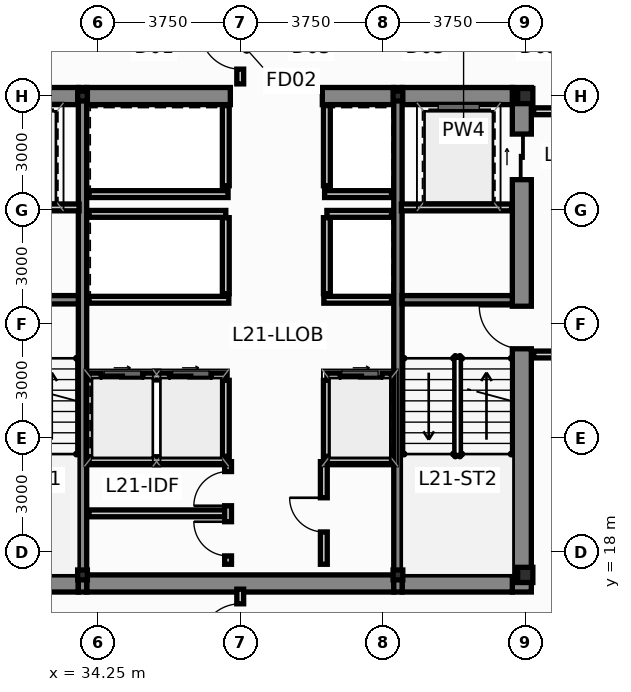
"""IFC4 building model, lengths in metres.
Left out: names, types, materials, properties, quantities, classifications, styles, units other than length and angle.
Written with IfcOpenShell. Run it as: python <this file> out.ifc"""

import sys

from ifc_helpers import new_model, si_unit, direction, frame, frame_2d, origin, origin_2d, place, context, subcontext, project, spatial, rectangle, i_section, extrude, source, transform, mapped, element, fill, save


model = new_model("IFC4")
c1 = context("Model", 3, precision=1e-05, world=origin(), true_north=direction((0.0, 1.0)))
c2 = subcontext(c1, "Body", "Model", "MODEL_VIEW")
j1 = project(units=[si_unit("LENGTHUNIT", "METRE"), si_unit("PLANEANGLEUNIT", "RADIAN")], contexts=[c1])
p1 = place(None, origin())
s1 = spatial("IfcSite", under=j1, at=p1, CompositionType="ELEMENT")
p2 = place(p1, origin())
s2 = spatial("IfcBuilding", under=s1, at=p2, CompositionType="ELEMENT")
p3 = place(p2, frame((0.0, 0.0, 83.5)))
s3 = spatial("IfcBuildingStorey", under=s2, at=p3, CompositionType="ELEMENT", Elevation=83.5)
m1 = source(origin(), c2, "Body", "SweptSolid", [
    extrude(i_section(OverallWidth=0.4, OverallDepth=0.4, WebThickness=0.02, FlangeThickness=0.032, at=origin_2d()), origin(), (0.0, 0.0, 1.0), 3.65),
])
for number, where, z_axis, x_axis in (
    (1, (45.5, 17.4, 0.0), (0.0, 0.0, 1.0), (1.0, 0.0, 0.0)),
    (2, (45.5, 30.0, 0.0), (0.0, 0.0, 1.0), (1.0, 0.0, 0.0)),
):
    element("IfcColumn", number, at=place(p3, frame(where, z_axis=z_axis, x_axis=x_axis)), inside=s3, PredefinedType="COLUMN", context=c2, shape_type="MappedRepresentation", body=[
        mapped(m1, transform((0.0, 0.0, 0.0), scale=1.0)),
    ])
m2 = source(origin(), c2, "Body", "SweptSolid", [
    extrude(i_section(OverallWidth=0.256, OverallDepth=0.26, WebThickness=0.01, FlangeThickness=0.017, at=origin_2d()), origin(), (0.0, 0.0, 1.0), 3.65),
])
for number, where, z_axis, x_axis in (
    (3, (33.85, 17.4, 0.0), (0.0, 0.0, 1.0), (1.0, 0.0, 0.0)),
    (4, (42.15, 17.4, 0.0), (0.0, 0.0, 1.0), (1.0, 0.0, 0.0)),
    (5, (33.85, 30.0, 0.0), (0.0, 0.0, 1.0), (1.0, 0.0, 0.0)),
    (6, (42.15, 30.0, 0.0), (0.0, 0.0, 1.0), (1.0, 0.0, 0.0)),
):
    element("IfcColumn", number, at=place(p3, frame(where, z_axis=z_axis, x_axis=x_axis)), inside=s3, PredefinedType="COLUMN", context=c2, shape_type="MappedRepresentation", body=[
        mapped(m2, transform((0.0, 0.0, 0.0), scale=1.0)),
    ])
p4 = place(p3, frame((45.41, 16.95, 0.0), z_axis=(0.0, 0.0, 1.0), x_axis=(0.0, 1.0, 0.0)))
e7 = element("IfcWall", 7, at=p4, inside=s3, PredefinedType="SHEAR", context=c2, shape_type="SweptSolid", body=[
    extrude(rectangle(XDim=13.275, YDim=0.5, at=frame_2d((6.638, 0.0))), origin(), (0.0, 0.0, 1.0), 3.65),
])
p5 = place(p4, frame((6.4, 0.0, 0.0)))
e8 = element("IfcOpeningElement", 8, at=p5, cuts=e7, PredefinedType="OPENING", context=c2, shape_type="SweptSolid", body=[
    extrude(rectangle(XDim=1.12, YDim=2.15, at=frame_2d((0.56, 1.075))), frame((0.0, 0.262, 0.0), z_axis=(0.0, -1.0, 0.0), x_axis=(1.0, 0.0, 0.0)), (0.0, 0.0, 1.0), 0.524),
])
p6 = place(p4, frame((10.85, 0.0, 0.0)))
e9 = element("IfcOpeningElement", 9, at=p6, cuts=e7, PredefinedType="OPENING", context=c2, shape_type="SweptSolid", body=[
    extrude(rectangle(XDim=1.2, YDim=2.2, at=frame_2d((0.6, 1.1))), frame((0.0, 0.262, 0.0), z_axis=(0.0, -1.0, 0.0), x_axis=(1.0, 0.0, 0.0)), (0.0, 0.0, 1.0), 0.524),
])
p7 = place(p3, frame((30.84, 17.175, 0.0), z_axis=(0.0, 0.0, 1.0), x_axis=(1.0, 0.0, 0.0)))
e10 = element("IfcWall", 10, at=p7, inside=s3, PredefinedType="SHEAR", context=c2, shape_type="SweptSolid", body=[
    extrude(rectangle(XDim=2.9, YDim=0.45, at=frame_2d((1.45, 0.0))), origin(), (0.0, 0.0, 1.0), 3.65),
])
p8 = place(p3, frame((33.96, 17.175, 0.0), z_axis=(0.0, 0.0, 1.0), x_axis=(1.0, 0.0, 0.0)))
e11 = element("IfcWall", 11, at=p8, inside=s3, PredefinedType="SHEAR", context=c2, shape_type="SweptSolid", body=[
    extrude(rectangle(XDim=8.08, YDim=0.45, at=frame_2d((4.04, 0.0))), origin(), (0.0, 0.0, 1.0), 3.65),
])
for number, where, z_axis, x_axis in (
    (12, (42.26, 17.175, 0.0), (0.0, 0.0, 1.0), (1.0, 0.0, 0.0)),
    (13, (30.84, 30.0, 0.0), (0.0, 0.0, 1.0), (1.0, 0.0, 0.0)),
):
    element("IfcWall", number, at=place(p3, frame(where, z_axis=z_axis, x_axis=x_axis)), inside=s3, PredefinedType="SHEAR", context=c2, shape_type="SweptSolid", body=[
        extrude(rectangle(XDim=2.9, YDim=0.45, at=frame_2d((1.45, 0.0))), origin(), (0.0, 0.0, 1.0), 3.65),
    ])
p9 = place(p3, frame((33.96, 30.0, 0.0), z_axis=(0.0, 0.0, 1.0), x_axis=(1.0, 0.0, 0.0)))
e14 = element("IfcWall", 14, at=p9, inside=s3, PredefinedType="SHEAR", context=c2, shape_type="SweptSolid", body=[
    extrude(rectangle(XDim=3.78, YDim=0.45, at=frame_2d((1.89, 0.0))), origin(), (0.0, 0.0, 1.0), 3.65),
])
p10 = place(p3, frame((40.16, 30.0, 0.0), z_axis=(0.0, 0.0, 1.0), x_axis=(1.0, 0.0, 0.0)))
e15 = element("IfcWall", 15, at=p10, inside=s3, PredefinedType="SHEAR", context=c2, shape_type="SweptSolid", body=[
    extrude(rectangle(XDim=1.88, YDim=0.45, at=frame_2d((0.94, 0.0))), origin(), (0.0, 0.0, 1.0), 3.65),
])
p11 = place(p3, frame((42.26, 30.0, 0.0), z_axis=(0.0, 0.0, 1.0), x_axis=(1.0, 0.0, 0.0)))
e16 = element("IfcWall", 16, at=p11, inside=s3, PredefinedType="SHEAR", context=c2, shape_type="SweptSolid", body=[
    extrude(rectangle(XDim=2.9, YDim=0.45, at=frame_2d((1.45, 0.0))), origin(), (0.0, 0.0, 1.0), 3.65),
])
for number, where, z_axis, x_axis in (
    (17, (33.85, 16.95, 0.0), (0.0, 0.0, 1.0), (0.0, 1.0, 0.0)),
    (18, (42.15, 16.95, 0.0), (0.0, 0.0, 1.0), (0.0, 1.0, 0.0)),
):
    element("IfcWall", number, at=place(p3, frame(where, z_axis=z_axis, x_axis=x_axis)), inside=s3, PredefinedType="SHEAR", context=c2, shape_type="SweptSolid", body=[
        extrude(rectangle(XDim=13.275, YDim=0.22, at=frame_2d((6.638, 0.0))), origin(), (0.0, 0.0, 1.0), 3.65),
    ])
for number, where, z_axis, x_axis in (
    (19, (30.84, 24.64, 0.0), (0.0, 0.0, 1.0), (1.0, 0.0, 0.0)),
    (20, (42.26, 24.64, 0.0), (0.0, 0.0, 1.0), (1.0, 0.0, 0.0)),
):
    element("IfcWall", number, at=place(p3, frame(where, z_axis=z_axis, x_axis=x_axis)), inside=s3, PredefinedType="SHEAR", context=c2, shape_type="SweptSolid", body=[
        extrude(rectangle(XDim=2.9, YDim=0.22, at=frame_2d((1.45, 0.0))), origin(), (0.0, 0.0, 1.0), 3.65),
    ])
p12 = place(p3, frame((34.02, 22.62, 0.0), z_axis=(0.0, 0.0, 1.0), x_axis=(1.0, 0.0, 0.0)))
e21 = element("IfcWall", 21, at=p12, inside=s3, PredefinedType="PARTITIONING", context=c2, shape_type="SweptSolid", body=[
    extrude(rectangle(XDim=3.6, YDim=0.18, at=frame_2d((1.8, 0.0))), origin(), (0.0, 0.0, 1.0), 3.4),
])
p13 = place(p12, frame((0.32, 0.0, 0.0)))
e22 = element("IfcOpeningElement", 22, at=p13, cuts=e21, PredefinedType="OPENING", context=c2, shape_type="SweptSolid", body=[
    extrude(rectangle(XDim=1.1, YDim=2.2, at=frame_2d((0.55, 1.1))), frame((0.0, 0.102, 0.0), z_axis=(0.0, -1.0, 0.0), x_axis=(1.0, 0.0, 0.0)), (0.0, 0.0, 1.0), 0.204),
])
p14 = place(p12, frame((2.12, 0.0, 0.0)))
e23 = element("IfcOpeningElement", 23, at=p14, cuts=e21, PredefinedType="OPENING", context=c2, shape_type="SweptSolid", body=[
    extrude(rectangle(XDim=1.1, YDim=2.2, at=frame_2d((0.55, 1.1))), frame((0.0, 0.102, 0.0), z_axis=(0.0, -1.0, 0.0), x_axis=(1.0, 0.0, 0.0)), (0.0, 0.0, 1.0), 0.204),
])
p15 = place(p3, frame((40.28, 22.62, 0.0), z_axis=(0.0, 0.0, 1.0), x_axis=(1.0, 0.0, 0.0)))
e24 = element("IfcWall", 24, at=p15, inside=s3, PredefinedType="PARTITIONING", context=c2, shape_type="SweptSolid", body=[
    extrude(rectangle(XDim=1.7, YDim=0.18, at=frame_2d((0.85, 0.0))), origin(), (0.0, 0.0, 1.0), 3.4),
])
p16 = place(p15, frame((0.35, 0.0, 0.0)))
e25 = element("IfcOpeningElement", 25, at=p16, cuts=e24, PredefinedType="OPENING", context=c2, shape_type="SweptSolid", body=[
    extrude(rectangle(XDim=1.1, YDim=2.2, at=frame_2d((0.55, 1.1))), frame((0.0, 0.102, 0.0), z_axis=(0.0, -1.0, 0.0), x_axis=(1.0, 0.0, 0.0)), (0.0, 0.0, 1.0), 0.204),
])
for number, where, z_axis, x_axis in (
    (26, (37.62, 20.52, 0.0), (0.0, 0.0, 1.0), (0.0, 1.0, 0.0)),
    (27, (40.28, 20.52, 0.0), (0.0, 0.0, 1.0), (0.0, 1.0, 0.0)),
):
    element("IfcWall", number, at=place(p3, frame(where, z_axis=z_axis, x_axis=x_axis)), inside=s3, PredefinedType="PARTITIONING", context=c2, shape_type="SweptSolid", body=[
        extrude(rectangle(XDim=2.0, YDim=0.18, at=frame_2d((1.0, 0.0))), origin(), (0.0, 0.0, 1.0), 3.4),
    ])
p17 = place(p3, frame((34.02, 26.9, 0.0), z_axis=(0.0, 0.0, 1.0), x_axis=(1.0, 0.0, 0.0)))
e28 = element("IfcWall", 28, at=p17, inside=s3, PredefinedType="PARTITIONING", context=c2, shape_type="SweptSolid", body=[
    extrude(rectangle(XDim=3.6, YDim=0.18, at=frame_2d((1.8, 0.0))), origin(), (0.0, 0.0, 1.0), 3.4),
])
p18 = place(p3, frame((40.28, 26.9, 0.0), z_axis=(0.0, 0.0, 1.0), x_axis=(1.0, 0.0, 0.0)))
e29 = element("IfcWall", 29, at=p18, inside=s3, PredefinedType="PARTITIONING", context=c2, shape_type="SweptSolid", body=[
    extrude(rectangle(XDim=1.7, YDim=0.18, at=frame_2d((0.85, 0.0))), origin(), (0.0, 0.0, 1.0), 3.4),
])
for number, where, z_axis, x_axis in (
    (30, (37.62, 24.8, 0.0), (0.0, 0.0, 1.0), (0.0, 1.0, 0.0)),
    (31, (40.28, 24.8, 0.0), (0.0, 0.0, 1.0), (0.0, 1.0, 0.0)),
):
    element("IfcWall", number, at=place(p3, frame(where, z_axis=z_axis, x_axis=x_axis)), inside=s3, PredefinedType="PARTITIONING", context=c2, shape_type="SweptSolid", body=[
        extrude(rectangle(XDim=2.0, YDim=0.18, at=frame_2d((1.0, 0.0))), origin(), (0.0, 0.0, 1.0), 3.4),
    ])
p19 = place(p3, frame((34.02, 24.64, 0.0), z_axis=(0.0, 0.0, 1.0), x_axis=(1.0, 0.0, 0.0)))
e32 = element("IfcWall", 32, at=p19, inside=s3, PredefinedType="PARTITIONING", context=c2, shape_type="SweptSolid", body=[
    extrude(rectangle(XDim=3.68, YDim=0.18, at=frame_2d((1.84, 0.0))), origin(), (0.0, 0.0, 1.0), 3.4),
])
p20 = place(p3, frame((40.2, 24.64, 0.0), z_axis=(0.0, 0.0, 1.0), x_axis=(1.0, 0.0, 0.0)))
e33 = element("IfcWall", 33, at=p20, inside=s3, PredefinedType="PARTITIONING", context=c2, shape_type="SweptSolid", body=[
    extrude(rectangle(XDim=1.78, YDim=0.18, at=frame_2d((0.89, 0.0))), origin(), (0.0, 0.0, 1.0), 3.4),
])
p21 = place(p3, frame((34.02, 27.42, 0.0), z_axis=(0.0, 0.0, 1.0), x_axis=(1.0, 0.0, 0.0)))
e34 = element("IfcWall", 34, at=p21, inside=s3, PredefinedType="PARTITIONING", context=c2, shape_type="SweptSolid", body=[
    extrude(rectangle(XDim=3.66, YDim=0.18, at=frame_2d((1.83, 0.0))), origin(), (0.0, 0.0, 1.0), 3.4),
])
p22 = place(p3, frame((40.22, 27.42, 0.0), z_axis=(0.0, 0.0, 1.0), x_axis=(1.0, 0.0, 0.0)))
e35 = element("IfcWall", 35, at=p22, inside=s3, PredefinedType="PARTITIONING", context=c2, shape_type="SweptSolid", body=[
    extrude(rectangle(XDim=1.76, YDim=0.18, at=frame_2d((0.88, 0.0))), origin(), (0.0, 0.0, 1.0), 3.4),
])
for number, where, z_axis, x_axis in (
    (36, (37.62, 27.64, 0.0), (0.0, 0.0, 1.0), (0.0, 1.0, 0.0)),
    (37, (40.28, 27.64, 0.0), (0.0, 0.0, 1.0), (0.0, 1.0, 0.0)),
):
    element("IfcWall", number, at=place(p3, frame(where, z_axis=z_axis, x_axis=x_axis)), inside=s3, PredefinedType="PARTITIONING", context=c2, shape_type="SweptSolid", body=[
        extrude(rectangle(XDim=2.11, YDim=0.18, at=frame_2d((1.055, 0.0))), origin(), (0.0, 0.0, 1.0), 3.4),
    ])
p23 = place(p3, frame((45.72, 23.2, 0.0), z_axis=(0.0, 0.0, 1.0), x_axis=(1.0, 0.0, 0.0)))
e38 = element("IfcWall", 38, at=p23, inside=s3, PredefinedType="PARTITIONING", context=c2, shape_type="SweptSolid", body=[
    extrude(rectangle(XDim=2.76, YDim=0.18, at=frame_2d((1.38, 0.0))), origin(), (0.0, 0.0, 1.0), 3.4),
])
p24 = place(p3, frame((45.72, 29.6, 0.0), z_axis=(0.0, 0.0, 1.0), x_axis=(1.0, 0.0, 0.0)))
e39 = element("IfcWall", 39, at=p24, inside=s3, PredefinedType="PARTITIONING", context=c2, shape_type="SweptSolid", body=[
    extrude(rectangle(XDim=2.76, YDim=0.18, at=frame_2d((1.38, 0.0))), origin(), (0.0, 0.0, 1.0), 2.783),
])
for number, where, z_axis, x_axis in (
    (40, (30.86, 27.07, 0.0), (0.0, 0.0, 1.0), (1.0, 0.0, 0.0)),
    (41, (42.24, 27.07, 0.0), (0.0, 0.0, 1.0), (1.0, 0.0, 0.0)),
):
    element("IfcWall", number, at=place(p3, frame(where, z_axis=z_axis, x_axis=x_axis)), inside=s3, PredefinedType="PARTITIONING", context=c2, shape_type="SweptSolid", body=[
        extrude(rectangle(XDim=2.9, YDim=0.18, at=frame_2d((1.45, 0.0))), origin(), (0.0, 0.0, 1.0), 3.4),
    ])
p25 = place(p3, frame((34.02, 20.42, 0.0), z_axis=(0.0, 0.0, 1.0), x_axis=(1.0, 0.0, 0.0)))
e42 = element("IfcWall", 42, at=p25, inside=s3, PredefinedType="PARTITIONING", context=c2, shape_type="SweptSolid", body=[
    extrude(rectangle(XDim=3.64, YDim=0.18, at=frame_2d((1.82, 0.0))), origin(), (0.0, 0.0, 1.0), 3.4),
])
p26 = place(p3, frame((40.22, 20.42, 0.0), z_axis=(0.0, 0.0, 1.0), x_axis=(1.0, 0.0, 0.0)))
e43 = element("IfcWall", 43, at=p26, inside=s3, PredefinedType="PARTITIONING", context=c2, shape_type="SweptSolid", body=[
    extrude(rectangle(XDim=1.76, YDim=0.18, at=frame_2d((0.88, 0.0))), origin(), (0.0, 0.0, 1.0), 3.4),
])
p27 = place(p3, frame((34.02, 19.02, 0.0), z_axis=(0.0, 0.0, 1.0), x_axis=(1.0, 0.0, 0.0)))
e44 = element("IfcWall", 44, at=p27, inside=s3, PredefinedType="PARTITIONING", context=c2, shape_type="SweptSolid", body=[
    extrude(rectangle(XDim=3.58, YDim=0.18, at=frame_2d((1.79, 0.0))), origin(), (0.0, 0.0, 1.0), 3.4),
])
p28 = place(p3, frame((37.68, 17.68, 0.0), z_axis=(0.0, 0.0, 1.0), x_axis=(0.0, 1.0, 0.0)))
e45 = element("IfcWall", 45, at=p28, inside=s3, PredefinedType="PARTITIONING", context=c2, shape_type="SweptSolid", body=[
    extrude(rectangle(XDim=2.7, YDim=0.18, at=frame_2d((1.35, 0.0))), origin(), (0.0, 0.0, 1.0), 3.4),
])
p29 = place(p28, frame((0.22, 0.0, 0.0)))
e46 = element("IfcOpeningElement", 46, at=p29, cuts=e45, PredefinedType="OPENING", context=c2, shape_type="SweptSolid", body=[
    extrude(rectangle(XDim=0.9, YDim=2.1, at=frame_2d((0.45, 1.05))), frame((0.0, 0.102, 0.0), z_axis=(0.0, -1.0, 0.0), x_axis=(1.0, 0.0, 0.0)), (0.0, 0.0, 1.0), 0.204),
])
p30 = place(p28, frame((1.54, 0.0, 0.0)))
e47 = element("IfcOpeningElement", 47, at=p30, cuts=e45, PredefinedType="OPENING", context=c2, shape_type="SweptSolid", body=[
    extrude(rectangle(XDim=0.9, YDim=2.1, at=frame_2d((0.45, 1.05))), frame((0.0, 0.102, 0.0), z_axis=(0.0, -1.0, 0.0), x_axis=(1.0, 0.0, 0.0)), (0.0, 0.0, 1.0), 0.204),
])
p31 = place(p3, frame((40.2, 17.68, 0.0), z_axis=(0.0, 0.0, 1.0), x_axis=(0.0, 1.0, 0.0)))
e48 = element("IfcWall", 48, at=p31, inside=s3, PredefinedType="PARTITIONING", context=c2, shape_type="SweptSolid", body=[
    extrude(rectangle(XDim=2.7, YDim=0.18, at=frame_2d((1.35, 0.0))), origin(), (0.0, 0.0, 1.0), 3.4),
])
p32 = place(p31, frame((0.85, 0.0, 0.0)))
e49 = element("IfcOpeningElement", 49, at=p32, cuts=e48, PredefinedType="OPENING", context=c2, shape_type="SweptSolid", body=[
    extrude(rectangle(XDim=0.9, YDim=2.1, at=frame_2d((0.45, 1.05))), frame((0.0, 0.102, 0.0), z_axis=(0.0, -1.0, 0.0), x_axis=(1.0, 0.0, 0.0)), (0.0, 0.0, 1.0), 0.204),
])
p33 = place(p3, frame((38.0, 15.205, 0.0), z_axis=(0.0, 0.0, 1.0), x_axis=(0.0, 1.0, 0.0)))
e50 = element("IfcWall", 50, at=p33, inside=s3, PredefinedType="PARTITIONING", context=c2, shape_type="SweptSolid", body=[
    extrude(rectangle(XDim=1.82, YDim=0.18, at=frame_2d((0.91, 0.0))), origin(), (0.0, 0.0, 1.0), 3.4),
])
p34 = place(p33, frame((0.385, 0.0, 0.0)))
e51 = element("IfcOpeningElement", 51, at=p34, cuts=e50, PredefinedType="OPENING", context=c2, shape_type="SweptSolid", body=[
    extrude(rectangle(XDim=1.05, YDim=2.15, at=frame_2d((0.525, 1.075))), frame((0.0, 0.102, 0.0), z_axis=(0.0, -1.0, 0.0), x_axis=(1.0, 0.0, 0.0)), (0.0, 0.0, 1.0), 0.204),
])
p35 = place(p3, frame((38.0, 30.32, 0.0), z_axis=(0.0, 0.0, 1.0), x_axis=(0.0, 1.0, 0.0)))
e52 = element("IfcWall", 52, at=p35, inside=s3, PredefinedType="PARTITIONING", context=c2, shape_type="SweptSolid", body=[
    extrude(rectangle(XDim=1.825, YDim=0.18, at=frame_2d((0.913, 0.0))), origin(), (0.0, 0.0, 1.0), 3.4),
])
p36 = place(p35, frame((0.388, 0.0, 0.0)))
e53 = element("IfcOpeningElement", 53, at=p36, cuts=e52, PredefinedType="OPENING", context=c2, shape_type="SweptSolid", body=[
    extrude(rectangle(XDim=1.05, YDim=2.15, at=frame_2d((0.525, 1.075))), frame((0.0, 0.102, 0.0), z_axis=(0.0, -1.0, 0.0), x_axis=(1.0, 0.0, 0.0)), (0.0, 0.0, 1.0), 0.204),
])
p37 = place(p5, origin())
e54 = element("IfcDoor", 54, at=p37, inside=s3, OperationType="SINGLE_SWING_RIGHT", PredefinedType="DOOR", context=c2, shape_type="SweptSolid", body=[
    extrude(rectangle(XDim=1.12, YDim=2.15, at=frame_2d((0.56, 1.075))), frame((0.0, 0.025, 0.0), z_axis=(0.0, -1.0, 0.0), x_axis=(1.0, 0.0, 0.0)), (0.0, 0.0, 1.0), 0.05),
])
fill(e8, e54)
p38 = place(p6, origin())
e55 = element("IfcDoor", 55, at=p38, inside=s3, OperationType="SLIDING_TO_RIGHT", PredefinedType="DOOR", context=c2, shape_type="SweptSolid", body=[
    extrude(rectangle(XDim=1.2, YDim=2.2, at=frame_2d((0.6, 1.1))), frame((0.0, 0.025, 0.0), z_axis=(0.0, -1.0, 0.0), x_axis=(1.0, 0.0, 0.0)), (0.0, 0.0, 1.0), 0.05),
])
fill(e9, e55)
p39 = place(p13, origin())
e56 = element("IfcDoor", 56, at=p39, inside=s3, OperationType="SLIDING_TO_LEFT", PredefinedType="DOOR", context=c2, shape_type="SweptSolid", body=[
    extrude(rectangle(XDim=1.1, YDim=2.2, at=frame_2d((0.55, 1.1))), frame((0.0, 0.025, 0.0), z_axis=(0.0, -1.0, 0.0), x_axis=(1.0, 0.0, 0.0)), (0.0, 0.0, 1.0), 0.05),
])
fill(e22, e56)
p40 = place(p14, origin())
e57 = element("IfcDoor", 57, at=p40, inside=s3, OperationType="SLIDING_TO_RIGHT", PredefinedType="DOOR", context=c2, shape_type="SweptSolid", body=[
    extrude(rectangle(XDim=1.1, YDim=2.2, at=frame_2d((0.55, 1.1))), frame((0.0, 0.025, 0.0), z_axis=(0.0, -1.0, 0.0), x_axis=(1.0, 0.0, 0.0)), (0.0, 0.0, 1.0), 0.05),
])
fill(e23, e57)
p41 = place(p16, origin())
e58 = element("IfcDoor", 58, at=p41, inside=s3, OperationType="SLIDING_TO_LEFT", PredefinedType="DOOR", context=c2, shape_type="SweptSolid", body=[
    extrude(rectangle(XDim=1.1, YDim=2.2, at=frame_2d((0.55, 1.1))), frame((0.0, 0.025, 0.0), z_axis=(0.0, -1.0, 0.0), x_axis=(1.0, 0.0, 0.0)), (0.0, 0.0, 1.0), 0.05),
])
fill(e25, e58)
p42 = place(p29, origin())
e59 = element("IfcDoor", 59, at=p42, inside=s3, OperationType="SINGLE_SWING_RIGHT", PredefinedType="DOOR", context=c2, shape_type="SweptSolid", body=[
    extrude(rectangle(XDim=0.9, YDim=2.1, at=frame_2d((0.45, 1.05))), frame((0.0, 0.025, 0.0), z_axis=(0.0, -1.0, 0.0), x_axis=(1.0, 0.0, 0.0)), (0.0, 0.0, 1.0), 0.05),
])
fill(e46, e59)
p43 = place(p30, origin())
e60 = element("IfcDoor", 60, at=p43, inside=s3, OperationType="SINGLE_SWING_LEFT", PredefinedType="DOOR", context=c2, shape_type="SweptSolid", body=[
    extrude(rectangle(XDim=0.9, YDim=2.1, at=frame_2d((0.45, 1.05))), frame((0.0, 0.025, 0.0), z_axis=(0.0, -1.0, 0.0), x_axis=(1.0, 0.0, 0.0)), (0.0, 0.0, 1.0), 0.05),
])
fill(e47, e60)
p44 = place(p32, origin())
e61 = element("IfcDoor", 61, at=p44, inside=s3, OperationType="SINGLE_SWING_RIGHT", PredefinedType="DOOR", context=c2, shape_type="SweptSolid", body=[
    extrude(rectangle(XDim=0.9, YDim=2.1, at=frame_2d((0.45, 1.05))), frame((0.0, 0.025, 0.0), z_axis=(0.0, -1.0, 0.0), x_axis=(1.0, 0.0, 0.0)), (0.0, 0.0, 1.0), 0.05),
])
fill(e49, e61)
p45 = place(p34, origin())
e62 = element("IfcDoor", 62, at=p45, inside=s3, OperationType="SINGLE_SWING_LEFT", PredefinedType="DOOR", context=c2, shape_type="SweptSolid", body=[
    extrude(rectangle(XDim=1.05, YDim=2.15, at=frame_2d((0.525, 1.075))), frame((0.0, 0.025, 0.0), z_axis=(0.0, -1.0, 0.0), x_axis=(1.0, 0.0, 0.0)), (0.0, 0.0, 1.0), 0.05),
])
fill(e51, e62)
p46 = place(p36, origin())
e63 = element("IfcDoor", 63, at=p46, inside=s3, OperationType="SINGLE_SWING_RIGHT", PredefinedType="DOOR", context=c2, shape_type="SweptSolid", body=[
    extrude(rectangle(XDim=1.05, YDim=2.15, at=frame_2d((0.525, 1.075))), frame((0.0, 0.025, 0.0), z_axis=(0.0, -1.0, 0.0), x_axis=(1.0, 0.0, 0.0)), (0.0, 0.0, 1.0), 0.05),
])
fill(e53, e63)
save(model, sys.argv[1])
